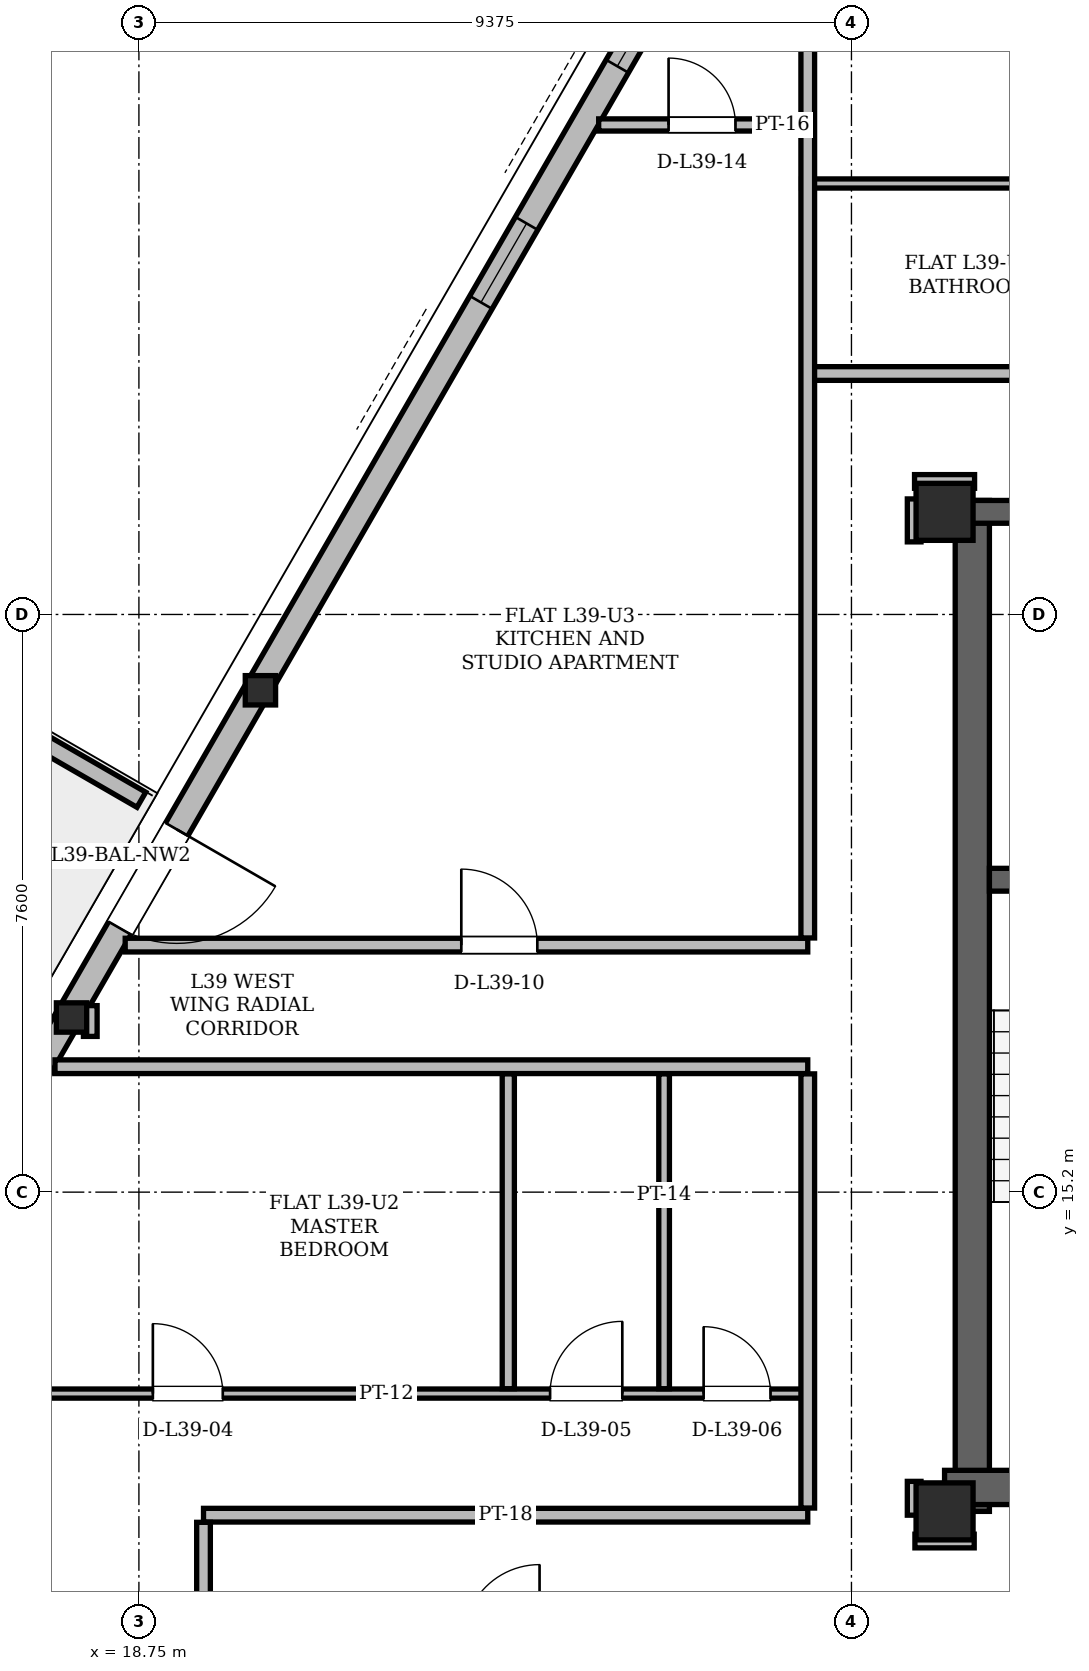
"""IFC4 building model, lengths in metres.
Left out: names, types, materials, properties, quantities, classifications, styles, units other than length and angle.
Written with IfcOpenShell. Run it as: python <this file> out.ifc"""

import sys

from ifc_helpers import new_model, si_unit, direction, frame, frame_2d, origin, origin_2d, place, context, subcontext, project, spatial, polyline, rectangle, hollow_rectangle, i_section, outline, extrude, element, fill, save


model = new_model("IFC4")
c1 = context("Model", 3, precision=1e-05, world=origin(), true_north=direction((0.0, 1.0)))
c2 = subcontext(c1, "Body", "Model", "MODEL_VIEW")
j1 = project(units=[si_unit("LENGTHUNIT", "METRE"), si_unit("PLANEANGLEUNIT", "RADIAN")], contexts=[c1])
p1 = place(None, origin())
s1 = spatial("IfcSite", under=j1, at=p1, CompositionType="ELEMENT")
p2 = place(p1, origin())
s2 = spatial("IfcBuilding", under=s1, at=p2, CompositionType="ELEMENT")
p3 = place(p2, frame((0.0, 0.0, 149.4)))
s3 = spatial("IfcBuildingStorey", under=s2, at=p3, CompositionType="ELEMENT", Elevation=149.4)
for number, where, z_axis, x_axis in (
    (1, (29.35, 11.0, 0.0), (0.0, 0.0, 1.0), (1.0, 0.0, 0.0)),
    (2, (29.35, 24.15, 0.0), (0.0, 0.0, 1.0), (1.0, 0.0, 0.0)),
):
    element("IfcColumn", number, at=place(p3, frame(where, z_axis=z_axis, x_axis=x_axis)), inside=s3, PredefinedType="COLUMN", context=c2, shape_type="SweptSolid", body=[
        extrude(hollow_rectangle(XDim=0.75, YDim=0.75, WallThickness=0.06, at=origin_2d()), origin(), (0.0, 0.0, 1.0), 3.6),
    ])
p4 = place(p3, frame((20.319, 21.828, 0.005), z_axis=(0.016720476684, -0.014001699987, 0.999762160745), x_axis=(0.642021876199, 0.766686318179, 0.0)))
e3 = element("IfcColumn", 3, at=p4, inside=s3, PredefinedType="COLUMN", context=c2, shape_type="SweptSolid", body=[
    extrude(i_section(OverallWidth=0.399, OverallDepth=0.386, WebThickness=0.021, FlangeThickness=0.033, at=origin_2d()), origin(), (0.0, 0.0, 1.0), 3.592),
])
p5 = place(p3, frame((17.836, 17.527, 0.005), z_axis=(0.015428854681, -0.016244476955, 0.999749002206), x_axis=(0.725075174229, 0.688669726151, 0.0)))
e4 = element("IfcColumn", 4, at=p5, inside=s3, PredefinedType="COLUMN", context=c2, shape_type="SweptSolid", body=[
    extrude(i_section(OverallWidth=0.399, OverallDepth=0.386, WebThickness=0.021, FlangeThickness=0.033, at=origin_2d()), origin(), (0.0, 0.0, 1.0), 3.592),
])
p6 = place(p3, frame((29.715, 11.0, 0.0), z_axis=(0.0, 0.0, 1.0), x_axis=(0.0, 1.0, 0.0)))
e5 = element("IfcWall", 5, at=p6, inside=s3, PredefinedType="SHEAR", context=c2, shape_type="SweptSolid", body=[
    extrude(rectangle(XDim=13.3, YDim=0.45, at=frame_2d((6.65, 0.0))), origin(), (0.0, 0.0, 1.0), 3.38),
])
p7 = place(p3, frame((29.35, 11.315, 0.0), z_axis=(0.0, 0.0, 1.0), x_axis=(1.0, 0.0, 0.0)))
e6 = element("IfcWall", 6, at=p7, inside=s3, PredefinedType="SHEAR", context=c2, shape_type="SweptSolid", body=[
    extrude(rectangle(XDim=7.1, YDim=0.45, at=frame_2d((3.55, 0.0))), origin(), (0.0, 0.0, 1.0), 3.38),
])
p8 = place(p3, frame((29.65, 24.15, 0.0), z_axis=(0.0, 0.0, 1.0), x_axis=(1.0, 0.0, 0.0)))
e7 = element("IfcWall", 7, at=p8, inside=s3, PredefinedType="SHEAR", context=c2, shape_type="SweptSolid", body=[
    extrude(rectangle(XDim=15.7, YDim=0.3, at=frame_2d((7.85, 0.0))), origin(), (0.0, 0.0, 1.0), 3.38),
])
p9 = place(p8, frame((1.7, 0.0, 0.0)))
e8 = element("IfcOpeningElement", 8, at=p9, cuts=e7, PredefinedType="OPENING", context=c2, shape_type="SweptSolid", body=[
    extrude(rectangle(XDim=1.2, YDim=2.2, at=frame_2d((0.6, 1.1))), frame((0.0, 0.15, 0.0), z_axis=(0.0, -1.0, 0.0), x_axis=(1.0, 0.0, 0.0)), (0.0, 0.0, 1.0), 0.3),
])
p10 = place(p8, frame((12.8, 0.0, 0.0)))
e9 = element("IfcOpeningElement", 9, at=p10, cuts=e7, PredefinedType="OPENING", context=c2, shape_type="SweptSolid", body=[
    extrude(rectangle(XDim=1.2, YDim=2.2, at=frame_2d((0.6, 1.1))), frame((0.0, 0.15, 0.0), z_axis=(0.0, -1.0, 0.0), x_axis=(1.0, 0.0, 0.0)), (0.0, 0.0, 1.0), 0.3),
])
p11 = place(p8, frame((6.55, 0.0, 0.0)))
e10 = element("IfcOpeningElement", 10, at=p11, cuts=e7, PredefinedType="OPENING", context=c2, shape_type="SweptSolid", body=[
    extrude(rectangle(XDim=0.9, YDim=2.05, at=frame_2d((0.45, 1.025))), frame((0.0, 0.15, 0.0), z_axis=(0.0, -1.0, 0.0), x_axis=(1.0, 0.0, 0.0)), (0.0, 0.0, 1.0), 0.3),
])
p12 = place(p8, frame((8.45, 0.0, 0.0)))
e11 = element("IfcOpeningElement", 11, at=p12, cuts=e7, PredefinedType="OPENING", context=c2, shape_type="SweptSolid", body=[
    extrude(rectangle(XDim=0.9, YDim=2.05, at=frame_2d((0.45, 1.025))), frame((0.0, 0.15, 0.0), z_axis=(0.0, -1.0, 0.0), x_axis=(1.0, 0.0, 0.0)), (0.0, 0.0, 1.0), 0.3),
])
p13 = place(p3, frame((29.94, 19.31, 0.0), z_axis=(0.0, 0.0, 1.0), x_axis=(1.0, 0.0, 0.0)))
e12 = element("IfcWall", 12, at=p13, inside=s3, PredefinedType="SHEAR", context=c2, shape_type="SweptSolid", body=[
    extrude(rectangle(XDim=4.01, YDim=0.3, at=frame_2d((2.005, 0.0))), origin(), (0.0, 0.0, 1.0), 3.38),
])
p14 = place(p13, frame((1.01, 0.0, 0.0)))
e13 = element("IfcOpeningElement", 13, at=p14, cuts=e12, PredefinedType="OPENING", context=c2, shape_type="SweptSolid", body=[
    extrude(rectangle(XDim=1.4, YDim=2.2, at=frame_2d((0.7, 1.1))), frame((0.0, 0.15, 0.0), z_axis=(0.0, -1.0, 0.0), x_axis=(1.0, 0.0, 0.0)), (0.0, 0.0, 1.0), 0.3),
])
p15 = place(p3, frame((14.998, 12.612, 0.0), z_axis=(0.0, 0.0, 1.0), x_axis=(0.499981853705, -0.866035880299, 0.0)))
e14 = element("IfcWall", 14, at=p15, inside=s3, PredefinedType="SOLIDWALL", context=c2, shape_type="SweptSolid", body=[
    extrude(rectangle(XDim=9.532, YDim=0.34, at=frame_2d((4.766, 0.0))), origin(), (0.0, 0.0, 1.0), 2.6),
])
p16 = place(p3, frame((32.734, 43.331, 0.0), z_axis=(0.0, 0.0, 1.0), x_axis=(-0.499998697515, -0.866026155773, 0.0)))
e15 = element("IfcWall", 15, at=p16, inside=s3, PredefinedType="SOLIDWALL", context=c2, shape_type="SweptSolid", body=[
    extrude(rectangle(XDim=35.472, YDim=0.34, at=frame_2d((17.736, 0.0))), origin(), (0.0, 0.0, 1.0), 2.6),
])
p17 = place(p16, frame((8.034, 0.0, 0.0)))
e16 = element("IfcOpeningElement", 16, at=p17, cuts=e15, PredefinedType="OPENING", context=c2, shape_type="SweptSolid", body=[
    extrude(rectangle(XDim=1.5, YDim=2.2, at=frame_2d((0.75, 1.1))), frame((0.0, 0.17, 0.0), z_axis=(0.0, -1.0, 0.0), x_axis=(1.0, 0.0, 0.0)), (0.0, 0.0, 1.0), 0.34),
])
p18 = place(p16, frame((26.973, 0.0, 0.0)))
e17 = element("IfcOpeningElement", 17, at=p18, cuts=e15, PredefinedType="OPENING", context=c2, shape_type="SweptSolid", body=[
    extrude(rectangle(XDim=1.5, YDim=2.2, at=frame_2d((0.75, 1.1))), frame((0.0, 0.17, 0.0), z_axis=(0.0, -1.0, 0.0), x_axis=(1.0, 0.0, 0.0)), (0.0, 0.0, 1.0), 0.34),
])
p19 = place(p16, frame((33.0, 0.0, 0.85)))
e18 = element("IfcOpeningElement", 18, at=p19, cuts=e15, PredefinedType="OPENING", context=c2, shape_type="SweptSolid", body=[
    extrude(rectangle(XDim=1.2, YDim=1.48, at=frame_2d((0.6, 0.74))), frame((0.0, 0.17, 0.0), z_axis=(0.0, -1.0, 0.0), x_axis=(1.0, 0.0, 0.0)), (0.0, 0.0, 1.0), 0.34),
])
p20 = place(p16, frame((17.767, 0.0, 0.85)))
e19 = element("IfcOpeningElement", 19, at=p20, cuts=e15, PredefinedType="OPENING", context=c2, shape_type="SweptSolid", body=[
    extrude(rectangle(XDim=1.2, YDim=1.48, at=frame_2d((0.6, 0.74))), frame((0.0, 0.17, 0.0), z_axis=(0.0, -1.0, 0.0), x_axis=(1.0, 0.0, 0.0)), (0.0, 0.0, 1.0), 0.34),
])
p21 = place(p16, frame((11.513, 0.0, 0.85)))
e20 = element("IfcOpeningElement", 20, at=p21, cuts=e15, PredefinedType="OPENING", context=c2, shape_type="SweptSolid", body=[
    extrude(rectangle(XDim=1.2, YDim=1.48, at=frame_2d((0.6, 0.74))), frame((0.0, 0.17, 0.0), z_axis=(0.0, -1.0, 0.0), x_axis=(1.0, 0.0, 0.0)), (0.0, 0.0, 1.0), 0.34),
])
p22 = place(p16, frame((14.179, 0.0, 0.85)))
e21 = element("IfcOpeningElement", 21, at=p22, cuts=e15, PredefinedType="OPENING", context=c2, shape_type="SweptSolid", body=[
    extrude(rectangle(XDim=1.2, YDim=1.48, at=frame_2d((0.6, 0.74))), frame((0.0, 0.17, 0.0), z_axis=(0.0, -1.0, 0.0), x_axis=(1.0, 0.0, 0.0)), (0.0, 0.0, 1.0), 0.34),
])
p23 = place(p16, frame((2.823, 0.0, 0.85)))
e22 = element("IfcOpeningElement", 22, at=p23, cuts=e15, PredefinedType="OPENING", context=c2, shape_type="SweptSolid", body=[
    extrude(rectangle(XDim=1.6, YDim=1.64, at=frame_2d((0.8, 0.82))), frame((0.0, 0.17, 0.0), z_axis=(0.0, -1.0, 0.0), x_axis=(1.0, 0.0, 0.0)), (0.0, 0.0, 1.0), 0.34),
])
p24 = place(p3, frame((18.782, 20.362, 0.0), z_axis=(0.0, 0.0, 1.0), x_axis=(-0.866012356593, 0.500022597718, 0.0)))
e23 = element("IfcWall", 23, at=p24, inside=s3, PredefinedType="PARAPET", context=c2, shape_type="SweptSolid", body=[
    extrude(outline(polyline([(0.0, 0.0), (2.042, 0.0), (2.042, 1.1), (0.0, 1.32), (0.0, 0.0)])), frame((0.0, 0.115, 0.0), z_axis=(0.0, -1.0, 0.0), x_axis=(1.0, 0.0, 0.0)), (0.0, 0.0, 1.0), 0.23),
])
p25 = place(p3, frame((28.96, 10.61, 0.0), z_axis=(0.0, 0.0, 1.0), x_axis=(1.0, 0.0, 0.0)))
e24 = element("IfcWall", 24, at=p25, inside=s3, PredefinedType="PARTITIONING", context=c2, shape_type="SweptSolid", body=[
    extrude(rectangle(XDim=0.78, YDim=0.18, at=frame_2d((0.39, 0.0))), origin(), (0.0, 0.0, 1.0), 3.38),
])
p26 = place(p3, frame((19.6, 10.95, 0.0), z_axis=(0.0, 0.0, 1.0), x_axis=(1.0, 0.0, 0.0)))
e25 = element("IfcWall", 25, at=p26, inside=s3, PredefinedType="PARTITIONING", context=c2, shape_type="SweptSolid", body=[
    extrude(rectangle(XDim=7.95, YDim=0.18, at=frame_2d((3.975, 0.0))), origin(), (0.0, 0.0, 1.0), 3.38),
])
p27 = place(p3, frame((15.388, 12.55, 0.0), z_axis=(0.0, 0.0, 1.0), x_axis=(1.0, 0.0, 0.0)))
e26 = element("IfcWall", 26, at=p27, inside=s3, PredefinedType="PARTITIONING", context=c2, shape_type="SweptSolid", body=[
    extrude(rectangle(XDim=12.212, YDim=0.12, at=frame_2d((6.106, 0.0))), origin(), (0.0, 0.0, 1.0), 2.842),
])
p28 = place(p27, frame((3.545, 0.0, 0.0)))
e27 = element("IfcOpeningElement", 27, at=p28, cuts=e26, PredefinedType="OPENING", context=c2, shape_type="SweptSolid", body=[
    extrude(rectangle(XDim=0.92, YDim=2.12, at=frame_2d((0.46, 1.06))), frame((0.0, 0.06, 0.0), z_axis=(0.0, -1.0, 0.0), x_axis=(1.0, 0.0, 0.0)), (0.0, 0.0, 1.0), 0.12),
])
p29 = place(p27, frame((8.772, 0.0, 0.0)))
e28 = element("IfcOpeningElement", 28, at=p29, cuts=e26, PredefinedType="OPENING", context=c2, shape_type="SweptSolid", body=[
    extrude(rectangle(XDim=0.95, YDim=2.1, at=frame_2d((0.475, 1.05))), frame((0.0, 0.06, 0.0), z_axis=(0.0, -1.0, 0.0), x_axis=(1.0, 0.0, 0.0)), (0.0, 0.0, 1.0), 0.12),
])
p30 = place(p27, frame((10.792, 0.0, 0.0)))
e29 = element("IfcOpeningElement", 29, at=p30, cuts=e26, PredefinedType="OPENING", context=c2, shape_type="SweptSolid", body=[
    extrude(rectangle(XDim=0.88, YDim=2.08, at=frame_2d((0.44, 1.04))), frame((0.0, 0.06, 0.0), z_axis=(0.0, -1.0, 0.0), x_axis=(1.0, 0.0, 0.0)), (0.0, 0.0, 1.0), 0.12),
])
p31 = place(p3, frame((17.646, 16.85, 0.0), z_axis=(0.0, 0.0, 1.0), x_axis=(1.0, 0.0, 0.0)))
e30 = element("IfcWall", 30, at=p31, inside=s3, PredefinedType="PARTITIONING", context=c2, shape_type="SweptSolid", body=[
    extrude(rectangle(XDim=9.904, YDim=0.18, at=frame_2d((4.952, 0.0))), origin(), (0.0, 0.0, 1.0), 3.38),
])
p32 = place(p3, frame((18.57, 18.45, 0.0), z_axis=(0.0, 0.0, 1.0), x_axis=(1.0, 0.0, 0.0)))
e31 = element("IfcWall", 31, at=p32, inside=s3, PredefinedType="PARTITIONING", context=c2, shape_type="SweptSolid", body=[
    extrude(rectangle(XDim=8.98, YDim=0.18, at=frame_2d((4.49, 0.0))), origin(), (0.0, 0.0, 1.0), 3.38),
])
p33 = place(p32, frame((4.422, 0.0, 0.0)))
e32 = element("IfcOpeningElement", 32, at=p33, cuts=e31, PredefinedType="OPENING", context=c2, shape_type="SweptSolid", body=[
    extrude(rectangle(XDim=1.0, YDim=2.18, at=frame_2d((0.5, 1.09))), frame((0.0, 0.09, 0.0), z_axis=(0.0, -1.0, 0.0), x_axis=(1.0, 0.0, 0.0)), (0.0, 0.0, 1.0), 0.18),
])
p34 = place(p3, frame((28.955, 24.55, 0.0), z_axis=(0.0, 0.0, 1.0), x_axis=(1.0, 0.0, 0.0)))
e33 = element("IfcWall", 33, at=p34, inside=s3, PredefinedType="PARTITIONING", context=c2, shape_type="SweptSolid", body=[
    extrude(rectangle(XDim=0.79, YDim=0.18, at=frame_2d((0.395, 0.0))), origin(), (0.0, 0.0, 1.0), 2.842),
])
p35 = place(p3, frame((27.55, 25.97, 0.0), z_axis=(0.0, 0.0, 1.0), x_axis=(1.0, 0.0, 0.0)))
e34 = element("IfcWall", 34, at=p35, inside=s3, PredefinedType="PARTITIONING", context=c2, shape_type="SweptSolid", body=[
    extrude(rectangle(XDim=9.15, YDim=0.18, at=frame_2d((4.575, 0.0))), origin(), (0.0, 0.0, 1.0), 2.842),
])
p36 = place(p3, frame((27.468, 28.47, 0.0), z_axis=(0.0, 0.0, 1.0), x_axis=(1.0, 0.0, 0.0)))
e35 = element("IfcWall", 35, at=p36, inside=s3, PredefinedType="PARTITIONING", context=c2, shape_type="SweptSolid", body=[
    extrude(rectangle(XDim=9.314, YDim=0.12, at=frame_2d((4.657, 0.0))), origin(), (0.0, 0.0, 1.0), 3.38),
])
p37 = place(p36, frame((4.217, 0.0, 0.0)))
e36 = element("IfcOpeningElement", 36, at=p37, cuts=e35, PredefinedType="OPENING", context=c2, shape_type="SweptSolid", body=[
    extrude(rectangle(XDim=0.88, YDim=2.08, at=frame_2d((0.44, 1.04))), frame((0.0, 0.06, 0.0), z_axis=(0.0, -1.0, 0.0), x_axis=(1.0, 0.0, 0.0)), (0.0, 0.0, 1.0), 0.12),
])
p38 = place(p3, frame((24.799, 29.24, 0.0), z_axis=(0.0, 0.0, 1.0), x_axis=(1.0, 0.0, 0.0)))
e37 = element("IfcWall", 37, at=p38, inside=s3, PredefinedType="PARTITIONING", context=c2, shape_type="SweptSolid", body=[
    extrude(rectangle(XDim=2.833, YDim=0.16, at=frame_2d((1.417, 0.0))), origin(), (0.0, 0.0, 1.0), 3.38),
])
p39 = place(p38, frame((0.92, 0.0, 0.0)))
e38 = element("IfcOpeningElement", 38, at=p39, cuts=e37, PredefinedType="OPENING", context=c2, shape_type="SweptSolid", body=[
    extrude(rectangle(XDim=0.88, YDim=2.08, at=frame_2d((0.44, 1.04))), frame((0.0, 0.08, 0.0), z_axis=(0.0, -1.0, 0.0), x_axis=(1.0, 0.0, 0.0)), (0.0, 0.0, 1.0), 0.16),
])
p40 = place(p3, frame((18.11, 17.249, 0.0), z_axis=(0.0, 0.0, 1.0), x_axis=(0.0, 1.0, 0.0)))
e39 = element("IfcWall", 39, at=p40, inside=s3, PredefinedType="PARTITIONING", context=c2, shape_type="SweptSolid", body=[
    extrude(rectangle(XDim=0.405, YDim=0.18, at=frame_2d((0.203, 0.0))), origin(), (0.0, 0.0, 1.0), 3.38),
])
p41 = place(p3, frame((19.6, 9.394, 0.0), z_axis=(0.0, 0.0, 1.0), x_axis=(0.0, 1.0, 0.0)))
e40 = element("IfcWall", 40, at=p41, inside=s3, PredefinedType="PARTITIONING", context=c2, shape_type="SweptSolid", body=[
    extrude(rectangle(XDim=1.462, YDim=0.18, at=frame_2d((0.731, 0.0))), origin(), (0.0, 0.0, 1.0), 3.38),
])
p42 = place(p3, frame((23.61, 12.614, 0.0), z_axis=(0.0, 0.0, 1.0), x_axis=(0.0, 1.0, 0.0)))
e41 = element("IfcWall", 41, at=p42, inside=s3, PredefinedType="PARTITIONING", context=c2, shape_type="SweptSolid", body=[
    extrude(rectangle(XDim=4.142, YDim=0.16, at=frame_2d((2.071, 0.0))), origin(), (0.0, 0.0, 1.0), 3.38),
])
p43 = place(p3, frame((25.66, 12.614, 0.0), z_axis=(0.0, 0.0, 1.0), x_axis=(0.0, 1.0, 0.0)))
e42 = element("IfcWall", 42, at=p43, inside=s3, PredefinedType="PARTITIONING", context=c2, shape_type="SweptSolid", body=[
    extrude(rectangle(XDim=4.142, YDim=0.14, at=frame_2d((2.071, 0.0))), origin(), (0.0, 0.0, 1.0), 3.38),
])
p44 = place(p3, frame((27.55, 11.044, 0.0), z_axis=(0.0, 0.0, 1.0), x_axis=(0.0, 1.0, 0.0)))
e43 = element("IfcWall", 43, at=p44, inside=s3, PredefinedType="PARTITIONING", context=c2, shape_type="SweptSolid", body=[
    extrude(rectangle(XDim=5.712, YDim=0.18, at=frame_2d((2.856, 0.0))), origin(), (0.0, 0.0, 1.0), 2.842),
])
p45 = place(p3, frame((27.55, 18.544, 0.0), z_axis=(0.0, 0.0, 1.0), x_axis=(0.0, 1.0, 0.0)))
e44 = element("IfcWall", 44, at=p45, inside=s3, PredefinedType="PARTITIONING", context=c2, shape_type="SweptSolid", body=[
    extrude(rectangle(XDim=15.344, YDim=0.18, at=frame_2d((7.672, 0.0))), origin(), (0.0, 0.0, 1.0), 3.38),
])
p46 = place(p3, frame((28.95, 10.95, 0.0), z_axis=(0.0, 0.0, 1.0), x_axis=(0.0, 1.0, 0.0)))
e45 = element("IfcWall", 45, at=p46, inside=s3, PredefinedType="PARTITIONING", context=c2, shape_type="SweptSolid", body=[
    extrude(rectangle(XDim=0.445, YDim=0.18, at=frame_2d((0.223, 0.0))), origin(), (0.0, 0.0, 1.0), 2.842),
])
p47 = place(p3, frame((28.95, 23.755, 0.0), z_axis=(0.0, 0.0, 1.0), x_axis=(0.0, 1.0, 0.0)))
e46 = element("IfcWall", 46, at=p47, inside=s3, PredefinedType="PARTITIONING", context=c2, shape_type="SweptSolid", body=[
    extrude(rectangle(XDim=0.565, YDim=0.18, at=frame_2d((0.283, 0.0))), origin(), (0.0, 0.0, 1.0), 3.38),
])
p48 = place(p18, origin())
e47 = element("IfcDoor", 47, at=p48, inside=s3, OperationType="SINGLE_SWING_LEFT", PredefinedType="DOOR", context=c2, shape_type="SweptSolid", body=[
    extrude(rectangle(XDim=1.5, YDim=2.2, at=frame_2d((0.75, 1.1))), frame((0.0, 0.025, 0.0), z_axis=(0.0, -1.0, 0.0), x_axis=(1.0, 0.0, 0.0)), (0.0, 0.0, 1.0), 0.05),
])
fill(e17, e47)
p49 = place(p20, origin())
e48 = element("IfcWindow", 48, at=p49, inside=s3, PartitioningType="SINGLE_PANEL", PredefinedType="WINDOW", context=c2, shape_type="SweptSolid", body=[
    extrude(rectangle(XDim=1.2, YDim=1.48, at=frame_2d((0.6, 0.74))), frame((0.0, 0.03, 0.0), z_axis=(0.0, -1.0, 0.0), x_axis=(1.0, 0.0, 0.0)), (0.0, 0.0, 1.0), 0.06),
])
fill(e19, e48)
p50 = place(p22, origin())
e49 = element("IfcWindow", 49, at=p50, inside=s3, PartitioningType="SINGLE_PANEL", PredefinedType="WINDOW", context=c2, shape_type="SweptSolid", body=[
    extrude(rectangle(XDim=1.2, YDim=1.48, at=frame_2d((0.6, 0.74))), frame((0.0, 0.03, 0.0), z_axis=(0.0, -1.0, 0.0), x_axis=(1.0, 0.0, 0.0)), (0.0, 0.0, 1.0), 0.06),
])
fill(e21, e49)
p51 = place(p28, origin())
e50 = element("IfcDoor", 50, at=p51, inside=s3, OperationType="SINGLE_SWING_LEFT", PredefinedType="DOOR", context=c2, shape_type="SweptSolid", body=[
    extrude(rectangle(XDim=0.92, YDim=2.12, at=frame_2d((0.46, 1.06))), frame((0.0, 0.025, 0.0), z_axis=(0.0, -1.0, 0.0), x_axis=(1.0, 0.0, 0.0)), (0.0, 0.0, 1.0), 0.05),
])
fill(e27, e50)
p52 = place(p29, origin())
e51 = element("IfcDoor", 51, at=p52, inside=s3, OperationType="SINGLE_SWING_RIGHT", PredefinedType="DOOR", context=c2, shape_type="SweptSolid", body=[
    extrude(rectangle(XDim=0.95, YDim=2.1, at=frame_2d((0.475, 1.05))), frame((0.0, 0.025, 0.0), z_axis=(0.0, -1.0, 0.0), x_axis=(1.0, 0.0, 0.0)), (0.0, 0.0, 1.0), 0.05),
])
fill(e28, e51)
p53 = place(p30, origin())
e52 = element("IfcDoor", 52, at=p53, inside=s3, OperationType="SINGLE_SWING_LEFT", PredefinedType="DOOR", context=c2, shape_type="SweptSolid", body=[
    extrude(rectangle(XDim=0.88, YDim=2.08, at=frame_2d((0.44, 1.04))), frame((0.0, 0.025, 0.0), z_axis=(0.0, -1.0, 0.0), x_axis=(1.0, 0.0, 0.0)), (0.0, 0.0, 1.0), 0.05),
])
fill(e29, e52)
p54 = place(p33, origin())
e53 = element("IfcDoor", 53, at=p54, inside=s3, OperationType="SINGLE_SWING_LEFT", PredefinedType="DOOR", context=c2, shape_type="SweptSolid", body=[
    extrude(rectangle(XDim=1.0, YDim=2.18, at=frame_2d((0.5, 1.09))), frame((0.0, 0.025, 0.0), z_axis=(0.0, -1.0, 0.0), x_axis=(1.0, 0.0, 0.0)), (0.0, 0.0, 1.0), 0.05),
])
fill(e32, e53)
p55 = place(p39, origin())
e54 = element("IfcDoor", 54, at=p55, inside=s3, OperationType="SINGLE_SWING_LEFT", PredefinedType="DOOR", context=c2, shape_type="SweptSolid", body=[
    extrude(rectangle(XDim=0.88, YDim=2.08, at=frame_2d((0.44, 1.04))), frame((0.0, 0.025, 0.0), z_axis=(0.0, -1.0, 0.0), x_axis=(1.0, 0.0, 0.0)), (0.0, 0.0, 1.0), 0.05),
])
fill(e38, e54)
save(model, sys.argv[1])
